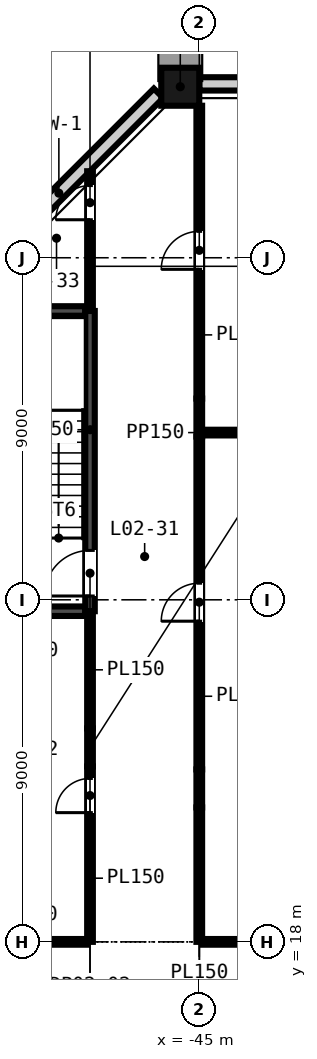
"""IFC4 building model, lengths in metres.
Left out: names, types, materials, properties, quantities, classifications, styles, units other than length and angle.
Written with IfcOpenShell. Run it as: python <this file> out.ifc"""

import sys

from ifc_helpers import new_model, si_unit, direction, frame, frame_2d, origin, origin_2d, place, context, subcontext, project, spatial, rectangle, extrude, element, fill, save


model = new_model("IFC4")
c1 = context("Model", 3, precision=1e-05, world=origin(), true_north=direction((0.0, 1.0)))
c2 = subcontext(c1, "Body", "Model", "MODEL_VIEW")
j1 = project(units=[si_unit("LENGTHUNIT", "METRE"), si_unit("PLANEANGLEUNIT", "RADIAN")], contexts=[c1])
p1 = place(None, origin())
s1 = spatial("IfcSite", under=j1, at=p1, CompositionType="ELEMENT")
p2 = place(p1, origin())
s2 = spatial("IfcBuilding", under=s1, at=p2, CompositionType="ELEMENT")
p3 = place(p2, frame((0.0, 0.0, 18.0)))
s3 = spatial("IfcBuildingStorey", under=s2, at=p3, CompositionType="ELEMENT", Elevation=18.0)
p4 = place(p3, frame((-45.5, 40.5, -0.4), z_axis=(0.0, 0.0, 1.0), x_axis=(-1.0, 0.0, 0.0)))
e1 = element("IfcColumn", 1, at=p4, inside=s3, PredefinedType="COLUMN", context=c2, shape_type="SweptSolid", body=[
    extrude(rectangle(XDim=1.0, YDim=1.0, at=origin_2d()), origin(), (0.0, 0.0, 1.0), 4.6),
])
p5 = place(p3, frame((-37.3, 40.575, -0.4), z_axis=(0.0, 0.0, 1.0), x_axis=(-1.0, 0.0, 0.0)))
e2 = element("IfcWall", 2, at=p5, inside=s3, PredefinedType="SOLIDWALL", context=c2, shape_type="SweptSolid", body=[
    extrude(rectangle(XDim=7.7, YDim=0.35, at=frame_2d((3.85, 0.0))), origin(), (0.0, 0.0, 1.0), 3.7),
])
p6 = place(p5, frame((2.85, 0.0, 1.3)))
e3 = element("IfcOpeningElement", 3, at=p6, cuts=e2, PredefinedType="OPENING", context=c2, shape_type="SweptSolid", body=[
    extrude(rectangle(XDim=2.0, YDim=2.35, at=frame_2d((1.0, 1.175))), frame((0.0, 0.185, 0.0), z_axis=(0.0, -1.0, 0.0), x_axis=(1.0, 0.0, 0.0)), (0.0, 0.0, 1.0), 0.37),
])
p7 = place(p3, frame((-46.072, 40.327, -0.4), z_axis=(0.0, 0.0, 1.0), x_axis=(-0.707106781187, -0.707106781187, 0.0)))
e4 = element("IfcWall", 4, at=p7, inside=s3, PredefinedType="SOLIDWALL", context=c2, shape_type="SweptSolid", body=[
    extrude(rectangle(XDim=7.433, YDim=0.35, at=frame_2d((3.716, 0.0))), origin(), (0.0, 0.0, 1.0), 3.7),
])
p8 = place(p3, frame((-51.0, 18.0, 0.0), z_axis=(0.0, 0.0, 1.0), x_axis=(1.0, 0.0, 0.0)))
e5 = element("IfcWall", 5, at=p8, inside=s3, PredefinedType="PARTITIONING", context=c2, shape_type="SweptSolid", body=[
    extrude(rectangle(XDim=3.05, YDim=0.15, at=frame_2d((1.525, 0.0))), origin(), (0.0, 0.0, 1.0), 4.2),
])
p9 = place(p3, frame((-44.925, 18.0, 0.0), z_axis=(0.0, 0.0, 1.0), x_axis=(1.0, 0.0, 0.0)))
e6 = element("IfcWall", 6, at=p9, inside=s3, PredefinedType="PARTITIONING", context=c2, shape_type="SweptSolid", body=[
    extrude(rectangle(XDim=9.9, YDim=0.15, at=frame_2d((4.95, 0.0))), origin(), (0.0, 0.0, 1.0), 4.2),
])
p10 = place(p3, frame((-51.0, 26.7, 0.0), z_axis=(0.0, 0.0, 1.0), x_axis=(1.0, 0.0, 0.0)))
e7 = element("IfcWall", 7, at=p10, inside=s3, PredefinedType="SHEAR", context=c2, shape_type="SweptSolid", body=[
    extrude(rectangle(XDim=3.0, YDim=0.25, at=frame_2d((1.5, 0.0))), origin(), (0.0, 0.0, 1.0), 4.2),
])
p11 = place(p3, frame((-44.925, 31.4, 0.0), z_axis=(0.0, 0.0, 1.0), x_axis=(1.0, 0.0, 0.0)))
e8 = element("IfcWall", 8, at=p11, inside=s3, PredefinedType="PARTITIONING", context=c2, shape_type="SweptSolid", body=[
    extrude(rectangle(XDim=1.123, YDim=0.15, at=frame_2d((0.562, 0.0))), origin(), (0.0, 0.0, 1.0), 3.111),
])
p12 = place(p3, frame((-51.0, 34.6, 0.0), z_axis=(0.0, 0.0, 1.0), x_axis=(1.0, 0.0, 0.0)))
e9 = element("IfcWall", 9, at=p12, inside=s3, PredefinedType="SHEAR", context=c2, shape_type="SweptSolid", body=[
    extrude(rectangle(XDim=3.0, YDim=0.25, at=frame_2d((1.5, 0.0))), origin(), (0.0, 0.0, 1.0), 4.2),
])
p13 = place(p3, frame((-47.875, 18.0, 0.0), z_axis=(0.0, 0.0, 1.0), x_axis=(0.0, 1.0, 0.0)))
e10 = element("IfcWall", 10, at=p13, inside=s3, PredefinedType="PARTITIONING", context=c2, shape_type="SweptSolid", body=[
    extrude(rectangle(XDim=4.616, YDim=0.15, at=frame_2d((2.308, 0.0))), origin(), (0.0, 0.0, 1.0), 4.2),
])
p14 = place(p13, frame((3.4, 0.0, 0.0)))
e11 = element("IfcOpeningElement", 11, at=p14, cuts=e10, PredefinedType="OPENING", context=c2, shape_type="SweptSolid", body=[
    extrude(rectangle(XDim=0.9, YDim=2.1, at=frame_2d((0.45, 1.05))), frame((0.0, 0.085, 0.0), z_axis=(0.0, -1.0, 0.0), x_axis=(1.0, 0.0, 0.0)), (0.0, 0.0, 1.0), 0.17),
])
p15 = place(p3, frame((-47.875, 22.616, 0.0), z_axis=(0.0, 0.0, 1.0), x_axis=(0.0, 1.0, 0.0)))
e12 = element("IfcWall", 12, at=p15, inside=s3, PredefinedType="PARTITIONING", context=c2, shape_type="SweptSolid", body=[
    extrude(rectangle(XDim=1.0, YDim=0.15, at=frame_2d((0.5, 0.0))), origin(), (0.0, 0.0, 1.0), 3.111),
])
p16 = place(p3, frame((-47.875, 23.616, 0.0), z_axis=(0.0, 0.0, 1.0), x_axis=(0.0, 1.0, 0.0)))
e13 = element("IfcWall", 13, at=p16, inside=s3, PredefinedType="PARTITIONING", context=c2, shape_type="SweptSolid", body=[
    extrude(rectangle(XDim=3.084, YDim=0.15, at=frame_2d((1.542, 0.0))), origin(), (0.0, 0.0, 1.0), 4.2),
])
p17 = place(p3, frame((-47.875, 26.7, 0.0), z_axis=(0.0, 0.0, 1.0), x_axis=(0.0, 1.0, 0.0)))
e14 = element("IfcWall", 14, at=p17, inside=s3, PredefinedType="SHEAR", context=c2, shape_type="SweptSolid", body=[
    extrude(rectangle(XDim=7.9, YDim=0.25, at=frame_2d((3.95, 0.0))), origin(), (0.0, 0.0, 1.0), 4.2),
])
p18 = place(p17, frame((0.4, 0.0, 0.0)))
e15 = element("IfcOpeningElement", 15, at=p18, cuts=e14, PredefinedType="OPENING", context=c2, shape_type="SweptSolid", body=[
    extrude(rectangle(XDim=1.2, YDim=2.1, at=frame_2d((0.6, 1.05))), frame((0.0, 0.135, 0.0), z_axis=(0.0, -1.0, 0.0), x_axis=(1.0, 0.0, 0.0)), (0.0, 0.0, 1.0), 0.27),
])
p19 = place(p3, frame((-47.875, 34.6, 0.0), z_axis=(0.0, 0.0, 1.0), x_axis=(0.0, 1.0, 0.0)))
e16 = element("IfcWall", 16, at=p19, inside=s3, PredefinedType="PARTITIONING", context=c2, shape_type="SweptSolid", body=[
    extrude(rectangle(XDim=3.677, YDim=0.15, at=frame_2d((1.838, 0.0))), origin(), (0.0, 0.0, 1.0), 3.667),
])
p20 = place(p19, frame((2.4, 0.0, 0.0)))
e17 = element("IfcOpeningElement", 17, at=p20, cuts=e16, PredefinedType="OPENING", context=c2, shape_type="SweptSolid", body=[
    extrude(rectangle(XDim=0.9, YDim=2.1, at=frame_2d((0.45, 1.05))), frame((0.0, 0.085, 0.0), z_axis=(0.0, -1.0, 0.0), x_axis=(1.0, 0.0, 0.0)), (0.0, 0.0, 1.0), 0.17),
])
p21 = place(p3, frame((-45.0, 18.0, 0.0), z_axis=(0.0, 0.0, 1.0), x_axis=(0.0, 1.0, 0.0)))
e18 = element("IfcWall", 18, at=p21, inside=s3, PredefinedType="PARTITIONING", context=c2, shape_type="SweptSolid", body=[
    extrude(rectangle(XDim=3.537, YDim=0.15, at=frame_2d((1.769, 0.0))), origin(), (0.0, 0.0, 1.0), 4.2),
])
p22 = place(p3, frame((-45.0, 21.537, 0.0), z_axis=(0.0, 0.0, 1.0), x_axis=(0.0, 1.0, 0.0)))
e19 = element("IfcWall", 19, at=p22, inside=s3, PredefinedType="PARTITIONING", context=c2, shape_type="SweptSolid", body=[
    extrude(rectangle(XDim=1.0, YDim=0.15, at=frame_2d((0.5, 0.0))), origin(), (0.0, 0.0, 1.0), 3.111),
])
p23 = place(p3, frame((-45.0, 22.537, 0.0), z_axis=(0.0, 0.0, 1.0), x_axis=(0.0, 1.0, 0.0)))
e20 = element("IfcWall", 20, at=p23, inside=s3, PredefinedType="PARTITIONING", context=c2, shape_type="SweptSolid", body=[
    extrude(rectangle(XDim=8.758, YDim=0.15, at=frame_2d((4.379, 0.0))), origin(), (0.0, 0.0, 1.0), 4.2),
])
p24 = place(p23, frame((3.9, 0.0, 0.0)))
e21 = element("IfcOpeningElement", 21, at=p24, cuts=e20, PredefinedType="OPENING", context=c2, shape_type="SweptSolid", body=[
    extrude(rectangle(XDim=1.0, YDim=2.1, at=frame_2d((0.5, 1.05))), frame((0.0, 0.085, 0.0), z_axis=(0.0, -1.0, 0.0), x_axis=(1.0, 0.0, 0.0)), (0.0, 0.0, 1.0), 0.17),
])
p25 = place(p3, frame((-45.0, 31.295, 0.0), z_axis=(0.0, 0.0, 1.0), x_axis=(0.0, 1.0, 0.0)))
e22 = element("IfcWall", 22, at=p25, inside=s3, PredefinedType="PARTITIONING", context=c2, shape_type="SweptSolid", body=[
    extrude(rectangle(XDim=1.0, YDim=0.15, at=frame_2d((0.5, 0.0))), origin(), (0.0, 0.0, 1.0), 3.111),
])
p26 = place(p3, frame((-45.0, 32.295, 0.0), z_axis=(0.0, 0.0, 1.0), x_axis=(0.0, 1.0, 0.0)))
e23 = element("IfcWall", 23, at=p26, inside=s3, PredefinedType="PARTITIONING", context=c2, shape_type="SweptSolid", body=[
    extrude(rectangle(XDim=7.705, YDim=0.15, at=frame_2d((3.852, 0.0))), origin(), (0.0, 0.0, 1.0), 4.2),
])
p27 = place(p26, frame((3.4, 0.0, 0.0)))
e24 = element("IfcOpeningElement", 24, at=p27, cuts=e23, PredefinedType="OPENING", context=c2, shape_type="SweptSolid", body=[
    extrude(rectangle(XDim=1.0, YDim=2.1, at=frame_2d((0.5, 1.05))), frame((0.0, 0.085, 0.0), z_axis=(0.0, -1.0, 0.0), x_axis=(1.0, 0.0, 0.0)), (0.0, 0.0, 1.0), 0.17),
])
p28 = place(p18, origin())
e25 = element("IfcDoor", 25, at=p28, inside=s3, OperationType="SINGLE_SWING_LEFT", PredefinedType="DOOR", context=c2, shape_type="SweptSolid", body=[
    extrude(rectangle(XDim=1.2, YDim=2.1, at=frame_2d((0.6, 1.05))), frame((0.0, 0.025, 0.0), z_axis=(0.0, -1.0, 0.0), x_axis=(1.0, 0.0, 0.0)), (0.0, 0.0, 1.0), 0.05),
])
fill(e15, e25)
p29 = place(p14, origin())
e26 = element("IfcDoor", 26, at=p29, inside=s3, OperationType="SINGLE_SWING_LEFT", PredefinedType="DOOR", context=c2, shape_type="SweptSolid", body=[
    extrude(rectangle(XDim=0.9, YDim=2.1, at=frame_2d((0.45, 1.05))), frame((0.0, 0.025, 0.0), z_axis=(0.0, -1.0, 0.0), x_axis=(1.0, 0.0, 0.0)), (0.0, 0.0, 1.0), 0.05),
])
fill(e11, e26)
p30 = place(p20, origin())
e27 = element("IfcDoor", 27, at=p30, inside=s3, OperationType="SINGLE_SWING_LEFT", PredefinedType="DOOR", context=c2, shape_type="SweptSolid", body=[
    extrude(rectangle(XDim=0.9, YDim=2.1, at=frame_2d((0.45, 1.05))), frame((0.0, 0.025, 0.0), z_axis=(0.0, -1.0, 0.0), x_axis=(1.0, 0.0, 0.0)), (0.0, 0.0, 1.0), 0.05),
])
fill(e17, e27)
p31 = place(p24, origin())
e28 = element("IfcDoor", 28, at=p31, inside=s3, OperationType="SINGLE_SWING_LEFT", PredefinedType="DOOR", context=c2, shape_type="SweptSolid", body=[
    extrude(rectangle(XDim=1.0, YDim=2.1, at=frame_2d((0.5, 1.05))), frame((0.0, 0.025, 0.0), z_axis=(0.0, -1.0, 0.0), x_axis=(1.0, 0.0, 0.0)), (0.0, 0.0, 1.0), 0.05),
])
fill(e21, e28)
p32 = place(p27, origin())
e29 = element("IfcDoor", 29, at=p32, inside=s3, OperationType="SINGLE_SWING_LEFT", PredefinedType="DOOR", context=c2, shape_type="SweptSolid", body=[
    extrude(rectangle(XDim=1.0, YDim=2.1, at=frame_2d((0.5, 1.05))), frame((0.0, 0.025, 0.0), z_axis=(0.0, -1.0, 0.0), x_axis=(1.0, 0.0, 0.0)), (0.0, 0.0, 1.0), 0.05),
])
fill(e24, e29)
save(model, sys.argv[1])
